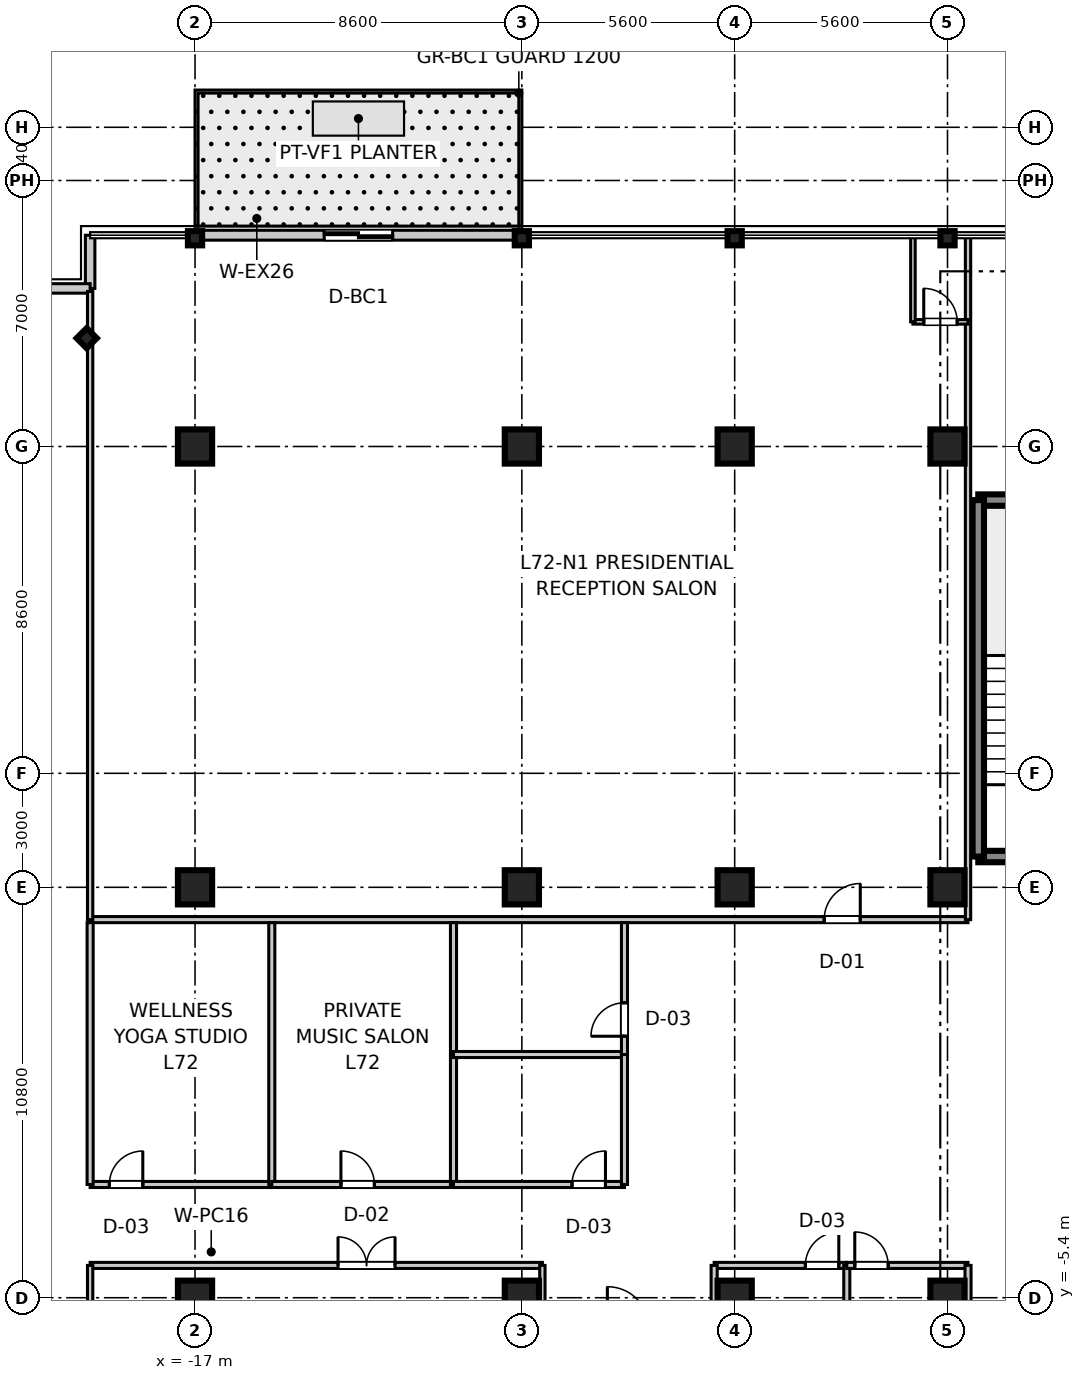
"""IFC4 building model, lengths in metres.
Left out: names, types, materials, properties, quantities, classifications, styles, units other than length and angle.
Written with IfcOpenShell. Run it as: python <this file> out.ifc"""

import sys

from ifc_helpers import new_model, si_unit, direction, frame, frame_2d, origin, origin_2d, place, context, subcontext, project, spatial, rectangle, i_section, extrude, source, transform, mapped, element, fill, save


model = new_model("IFC4")
c1 = context("Model", 3, precision=1e-05, world=origin(), true_north=direction((0.0, 1.0)))
c2 = subcontext(c1, "Body", "Model", "MODEL_VIEW")
j1 = project(units=[si_unit("LENGTHUNIT", "METRE"), si_unit("PLANEANGLEUNIT", "RADIAN")], contexts=[c1])
p1 = place(None, origin())
s1 = spatial("IfcSite", under=j1, at=p1, CompositionType="ELEMENT")
p2 = place(p1, origin())
s2 = spatial("IfcBuilding", under=s1, at=p2, CompositionType="ELEMENT")
p3 = place(p2, frame((0.0, 0.0, 281.3)))
s3 = spatial("IfcBuildingStorey", under=s2, at=p3, CompositionType="ELEMENT", Elevation=281.3)
m1 = source(origin(), c2, "Body", "SweptSolid", [
    extrude(rectangle(XDim=0.9, YDim=0.9, at=origin_2d()), origin(), (0.0, 0.0, 1.0), 3.705),
])
for number, where, z_axis, x_axis in (
    (1, (-17.0, -5.4, 0.0), (0.0, 0.0, 1.0), (1.0, 0.0, 0.0)),
    (2, (-17.0, 5.4, 0.0), (0.0, 0.0, 1.0), (1.0, 0.0, 0.0)),
    (3, (-17.0, 17.0, 0.0), (0.0, 0.0, 1.0), (1.0, 0.0, 0.0)),
    (4, (-8.4, -5.4, 0.0), (0.0, 0.0, 1.0), (1.0, 0.0, 0.0)),
    (5, (-8.4, 5.4, 0.0), (0.0, 0.0, 1.0), (1.0, 0.0, 0.0)),
    (6, (-8.4, 17.0, 0.0), (0.0, 0.0, 1.0), (1.0, 0.0, 0.0)),
    (7, (-2.8, -5.4, 0.0), (0.0, 0.0, 1.0), (1.0, 0.0, 0.0)),
    (8, (-2.8, 5.4, 0.0), (0.0, 0.0, 1.0), (1.0, 0.0, 0.0)),
    (9, (-2.8, 17.0, 0.0), (0.0, 0.0, 1.0), (1.0, 0.0, 0.0)),
    (10, (2.8, -5.4, 0.0), (0.0, 0.0, 1.0), (1.0, 0.0, 0.0)),
    (11, (2.8, 5.4, 0.0), (0.0, 0.0, 1.0), (1.0, 0.0, 0.0)),
    (12, (2.8, 17.0, 0.0), (0.0, 0.0, 1.0), (1.0, 0.0, 0.0)),
):
    element("IfcColumn", number, at=place(p3, frame(where, z_axis=z_axis, x_axis=x_axis)), inside=s3, PredefinedType="COLUMN", context=c2, shape_type="MappedRepresentation", body=[
        mapped(m1, transform((0.0, 0.0, 0.0), scale=1.0)),
    ])
m2 = source(origin(), c2, "Body", "SweptSolid", [
    extrude(i_section(OverallWidth=0.374, OverallDepth=0.374, WebThickness=0.014, FlangeThickness=0.023, at=origin_2d()), origin(), (0.0, 0.0, 1.0), 3.705),
])
for number, where, z_axis, x_axis in (
    (13, (-17.0, 22.48, 0.0), (0.0, 0.0, 1.0), (0.0, 1.0, 0.0)),
    (14, (-8.4, 22.48, 0.0), (0.0, 0.0, 1.0), (0.0, 1.0, 0.0)),
    (15, (-2.8, 22.48, 0.0), (0.0, 0.0, 1.0), (0.0, 1.0, 0.0)),
    (16, (2.8, 22.48, 0.0), (0.0, 0.0, 1.0), (0.0, 1.0, 0.0)),
    (17, (-19.85, 19.85, 0.0), (0.0, 0.0, 1.0), (0.707, 0.707, 0.0)),
):
    element("IfcColumn", number, at=place(p3, frame(where, z_axis=z_axis, x_axis=x_axis)), inside=s3, PredefinedType="COLUMN", context=c2, shape_type="MappedRepresentation", body=[
        mapped(m2, transform((0.0, 0.0, 0.0), scale=1.0)),
    ])
m3 = source(origin(), c2, "Body", "SweptSolid", [
    extrude(rectangle(XDim=3.98, YDim=0.3, at=frame_2d((1.99, 0.0))), origin(), (0.0, 0.0, 1.0), 3.45),
])
for number, where, z_axis, x_axis in (
    (18, (3.61, 6.21, 0.0), (0.0, 0.0, 1.0), (1.0, 0.0, 0.0)),
    (19, (3.61, 15.59, 0.0), (0.0, 0.0, 1.0), (1.0, 0.0, 0.0)),
):
    element("IfcWall", number, at=place(p3, frame(where, z_axis=z_axis, x_axis=x_axis)), inside=s3, PredefinedType="SHEAR", context=c2, shape_type="MappedRepresentation", body=[
        mapped(m3, transform((0.0, 0.0, 0.0), scale=1.0)),
    ])
m4 = source(origin(), c2, "Body", "SweptSolid", [
    extrude(rectangle(XDim=9.38, YDim=0.3, at=frame_2d((4.69, 0.0))), origin(), (0.0, 0.0, 1.0), 3.45),
])
p4 = place(p3, frame((3.61, 6.21, 0.0), z_axis=(0.0, 0.0, 1.0), x_axis=(0.0, 1.0, 0.0)))
e20 = element("IfcWall", 20, at=p4, inside=s3, PredefinedType="SHEAR", context=c2, shape_type="MappedRepresentation", body=[
    mapped(m4, transform((0.0, 0.0, 0.0), scale=1.0)),
])
m5 = source(origin(), c2, "Body", "SweptSolid", [
    extrude(rectangle(XDim=1.4, YDim=0.25, at=frame_2d((0.7, 0.0))), origin(), (0.0, 0.0, 1.0), 3.45),
])
p5 = place(p3, frame((-19.76, 21.16, 0.0), z_axis=(0.0, 0.0, 1.0), x_axis=(0.0, 1.0, 0.0)))
e21 = element("IfcWall", 21, at=p5, inside=s3, PredefinedType="STANDARD", context=c2, shape_type="MappedRepresentation", body=[
    mapped(m5, transform((0.0, 0.0, 0.0), scale=1.0)),
])
m6 = source(origin(), c2, "Body", "SweptSolid", [
    extrude(rectangle(XDim=1.4, YDim=0.25, at=frame_2d((0.7, 0.0))), origin(), (0.0, 0.0, 1.0), 3.45),
])
p6 = place(p3, frame((-21.16, 21.16, 0.0), z_axis=(0.0, 0.0, 1.0), x_axis=(1.0, 0.0, 0.0)))
e22 = element("IfcWall", 22, at=p6, inside=s3, PredefinedType="STANDARD", context=c2, shape_type="MappedRepresentation", body=[
    mapped(m6, transform((0.0, 0.0, 0.0), scale=1.0)),
])
m7 = source(origin(), c2, "Body", "SweptSolid", [
    extrude(rectangle(XDim=8.6, YDim=0.26, at=frame_2d((4.3, 0.0))), origin(), (0.0, 0.0, 1.0), 2.93),
])
p7 = place(p3, frame((-17.0, 22.56, 0.0), z_axis=(0.0, 0.0, 1.0), x_axis=(1.0, 0.0, 0.0)))
e23 = element("IfcWall", 23, at=p7, inside=s3, PredefinedType="STANDARD", context=c2, shape_type="MappedRepresentation", body=[
    mapped(m7, transform((0.0, 0.0, 0.0), scale=1.0)),
])
p8 = place(p7, frame((3.4, 0.0, 0.0)))
e24 = element("IfcOpeningElement", 24, at=p8, cuts=e23, PredefinedType="OPENING", context=c2, shape_type="SweptSolid", body=[
    extrude(rectangle(XDim=1.8, YDim=2.25, at=frame_2d((0.9, 1.125))), frame((0.0, 0.14, 0.0), z_axis=(0.0, -1.0, 0.0), x_axis=(1.0, 0.0, 0.0)), (0.0, 0.0, 1.0), 0.28),
])
m8 = source(origin(), c2, "Body", "SweptSolid", [
    extrude(rectangle(XDim=23.1, YDim=0.16, at=frame_2d((11.55, 0.0))), origin(), (0.0, 0.0, 1.0), 2.79),
])
p9 = place(p3, frame((-19.76, 4.55, 0.0), z_axis=(0.0, 0.0, 1.0), x_axis=(1.0, 0.0, 0.0)))
e25 = element("IfcWall", 25, at=p9, inside=s3, PredefinedType="PARTITIONING", context=c2, shape_type="MappedRepresentation", body=[
    mapped(m8, transform((0.0, 0.0, 0.0), scale=1.0)),
])
p10 = place(p9, frame((19.315, 0.0, 0.0)))
e26 = element("IfcOpeningElement", 26, at=p10, cuts=e25, PredefinedType="OPENING", context=c2, shape_type="SweptSolid", body=[
    extrude(rectangle(XDim=0.95, YDim=2.1, at=frame_2d((0.475, 1.05))), frame((0.0, 0.09, 0.0), z_axis=(0.0, -1.0, 0.0), x_axis=(1.0, 0.0, 0.0)), (0.0, 0.0, 1.0), 0.18),
])
m9 = source(origin(), c2, "Body", "SweptSolid", [
    extrude(rectangle(XDim=16.53, YDim=0.14, at=frame_2d((8.265, 0.0))), origin(), (0.0, 0.0, 1.0), 2.79),
])
p11 = place(p3, frame((-19.76, 4.55, 0.0), z_axis=(0.0, 0.0, 1.0), x_axis=(0.0, 1.0, 0.0)))
e27 = element("IfcWall", 27, at=p11, inside=s3, PredefinedType="PARTITIONING", context=c2, shape_type="MappedRepresentation", body=[
    mapped(m9, transform((0.0, 0.0, 0.0), scale=1.0)),
])
m10 = source(origin(), c2, "Body", "SweptSolid", [
    extrude(rectangle(XDim=17.95, YDim=0.14, at=frame_2d((8.975, 0.0))), origin(), (0.0, 0.0, 1.0), 2.79),
])
p12 = place(p3, frame((3.34, 4.55, 0.0), z_axis=(0.0, 0.0, 1.0), x_axis=(0.0, 1.0, 0.0)))
e28 = element("IfcWall", 28, at=p12, inside=s3, PredefinedType="PARTITIONING", context=c2, shape_type="MappedRepresentation", body=[
    mapped(m10, transform((0.0, 0.0, 0.0), scale=1.0)),
])
m11 = source(origin(), c2, "Body", "SweptSolid", [
    extrude(rectangle(XDim=1.45, YDim=0.12, at=frame_2d((0.725, 0.0))), origin(), (0.0, 0.0, 1.0), 2.79),
])
p13 = place(p3, frame((1.89, 20.28, 0.0), z_axis=(0.0, 0.0, 1.0), x_axis=(1.0, 0.0, 0.0)))
e29 = element("IfcWall", 29, at=p13, inside=s3, PredefinedType="PARTITIONING", context=c2, shape_type="MappedRepresentation", body=[
    mapped(m11, transform((0.0, 0.0, 0.0), scale=1.0)),
])
p14 = place(p13, frame((0.285, 0.0, 0.0)))
e30 = element("IfcOpeningElement", 30, at=p14, cuts=e29, PredefinedType="OPENING", context=c2, shape_type="SweptSolid", body=[
    extrude(rectangle(XDim=0.88, YDim=2.1, at=frame_2d((0.44, 1.05))), frame((0.0, 0.07, 0.0), z_axis=(0.0, -1.0, 0.0), x_axis=(1.0, 0.0, 0.0)), (0.0, 0.0, 1.0), 0.14),
])
m12 = source(origin(), c2, "Body", "SweptSolid", [
    extrude(rectangle(XDim=2.22, YDim=0.12, at=frame_2d((1.11, 0.0))), origin(), (0.0, 0.0, 1.0), 2.79),
])
p15 = place(p3, frame((1.89, 20.28, 0.0), z_axis=(0.0, 0.0, 1.0), x_axis=(0.0, 1.0, 0.0)))
e31 = element("IfcWall", 31, at=p15, inside=s3, PredefinedType="PARTITIONING", context=c2, shape_type="MappedRepresentation", body=[
    mapped(m12, transform((0.0, 0.0, 0.0), scale=1.0)),
])
m13 = source(origin(), c2, "Body", "SweptSolid", [
    extrude(rectangle(XDim=11.9, YDim=0.16, at=frame_2d((5.95, 0.0))), origin(), (0.0, 0.0, 1.0), 2.79),
])
p16 = place(p3, frame((-19.76, -4.55, 0.0), z_axis=(0.0, 0.0, 1.0), x_axis=(1.0, 0.0, 0.0)))
e32 = element("IfcWall", 32, at=p16, inside=s3, PredefinedType="PARTITIONING", context=c2, shape_type="MappedRepresentation", body=[
    mapped(m13, transform((0.0, 0.0, 0.0), scale=1.0)),
])
p17 = place(p16, frame((6.523, 0.0, 0.0)))
e33 = element("IfcOpeningElement", 33, at=p17, cuts=e32, PredefinedType="OPENING", context=c2, shape_type="SweptSolid", body=[
    extrude(rectangle(XDim=1.5, YDim=2.15, at=frame_2d((0.75, 1.075))), frame((0.0, 0.09, 0.0), z_axis=(0.0, -1.0, 0.0), x_axis=(1.0, 0.0, 0.0)), (0.0, 0.0, 1.0), 0.18),
])
p18 = place(p3, frame((-19.76, -21.08, 0.0), z_axis=(0.0, 0.0, 1.0), x_axis=(0.0, 1.0, 0.0)))
e34 = element("IfcWall", 34, at=p18, inside=s3, PredefinedType="PARTITIONING", context=c2, shape_type="MappedRepresentation", body=[
    mapped(m9, transform((0.0, 0.0, 0.0), scale=1.0)),
])
p19 = place(p3, frame((-7.86, -22.5, 0.0), z_axis=(0.0, 0.0, 1.0), x_axis=(0.0, 1.0, 0.0)))
e35 = element("IfcWall", 35, at=p19, inside=s3, PredefinedType="PARTITIONING", context=c2, shape_type="MappedRepresentation", body=[
    mapped(m10, transform((0.0, 0.0, 0.0), scale=1.0)),
])
m14 = source(origin(), c2, "Body", "SweptSolid", [
    extrude(rectangle(XDim=3.49, YDim=0.16, at=frame_2d((1.745, 0.0))), origin(), (0.0, 0.0, 1.0), 2.79),
])
p20 = place(p3, frame((-3.34, -4.55, 0.0), z_axis=(0.0, 0.0, 1.0), x_axis=(1.0, 0.0, 0.0)))
e36 = element("IfcWall", 36, at=p20, inside=s3, PredefinedType="PARTITIONING", context=c2, shape_type="MappedRepresentation", body=[
    mapped(m14, transform((0.0, 0.0, 0.0), scale=1.0)),
])
p21 = place(p20, frame((2.4, 0.0, 0.0)))
e37 = element("IfcOpeningElement", 37, at=p21, cuts=e36, PredefinedType="OPENING", context=c2, shape_type="SweptSolid", body=[
    extrude(rectangle(XDim=0.88, YDim=2.1, at=frame_2d((0.44, 1.05))), frame((0.0, 0.09, 0.0), z_axis=(0.0, -1.0, 0.0), x_axis=(1.0, 0.0, 0.0)), (0.0, 0.0, 1.0), 0.18),
])
m15 = source(origin(), c2, "Body", "SweptSolid", [
    extrude(rectangle(XDim=17.95, YDim=0.16, at=frame_2d((8.975, 0.0))), origin(), (0.0, 0.0, 1.0), 2.79),
])
for number, where, z_axis, x_axis in (
    (38, (-3.34, -22.5, 0.0), (0.0, 0.0, 1.0), (0.0, 1.0, 0.0)),
    (39, (0.15, -22.5, 0.0), (0.0, 0.0, 1.0), (0.0, 1.0, 0.0)),
):
    element("IfcWall", number, at=place(p3, frame(where, z_axis=z_axis, x_axis=x_axis)), inside=s3, PredefinedType="PARTITIONING", context=c2, shape_type="MappedRepresentation", body=[
        mapped(m15, transform((0.0, 0.0, 0.0), scale=1.0)),
    ])
m16 = source(origin(), c2, "Body", "SweptSolid", [
    extrude(rectangle(XDim=3.19, YDim=0.16, at=frame_2d((1.595, 0.0))), origin(), (0.0, 0.0, 1.0), 2.79),
])
p22 = place(p3, frame((0.15, -4.55, 0.0), z_axis=(0.0, 0.0, 1.0), x_axis=(1.0, 0.0, 0.0)))
e40 = element("IfcWall", 40, at=p22, inside=s3, PredefinedType="PARTITIONING", context=c2, shape_type="MappedRepresentation", body=[
    mapped(m16, transform((0.0, 0.0, 0.0), scale=1.0)),
])
p23 = place(p22, frame((0.21, 0.0, 0.0)))
e41 = element("IfcOpeningElement", 41, at=p23, cuts=e40, PredefinedType="OPENING", context=c2, shape_type="SweptSolid", body=[
    extrude(rectangle(XDim=0.88, YDim=2.1, at=frame_2d((0.44, 1.05))), frame((0.0, 0.09, 0.0), z_axis=(0.0, -1.0, 0.0), x_axis=(1.0, 0.0, 0.0)), (0.0, 0.0, 1.0), 0.18),
])
p24 = place(p3, frame((3.34, -22.5, 0.0), z_axis=(0.0, 0.0, 1.0), x_axis=(0.0, 1.0, 0.0)))
e42 = element("IfcWall", 42, at=p24, inside=s3, PredefinedType="PARTITIONING", context=c2, shape_type="MappedRepresentation", body=[
    mapped(m15, transform((0.0, 0.0, 0.0), scale=1.0)),
])
m17 = source(origin(), c2, "Body", "SweptSolid", [
    extrude(rectangle(XDim=4.78, YDim=0.16, at=frame_2d((2.39, 0.0))), origin(), (0.0, 0.0, 1.0), 2.79),
])
p25 = place(p3, frame((-19.76, -2.42, 0.0), z_axis=(0.0, 0.0, 1.0), x_axis=(1.0, 0.0, 0.0)))
e43 = element("IfcWall", 43, at=p25, inside=s3, PredefinedType="PARTITIONING", context=c2, shape_type="MappedRepresentation", body=[
    mapped(m17, transform((0.0, 0.0, 0.0), scale=1.0)),
])
p26 = place(p25, frame((0.506, 0.0, 0.0)))
e44 = element("IfcOpeningElement", 44, at=p26, cuts=e43, PredefinedType="OPENING", context=c2, shape_type="SweptSolid", body=[
    extrude(rectangle(XDim=0.88, YDim=2.1, at=frame_2d((0.44, 1.05))), frame((0.0, 0.09, 0.0), z_axis=(0.0, -1.0, 0.0), x_axis=(1.0, 0.0, 0.0)), (0.0, 0.0, 1.0), 0.18),
])
m18 = source(origin(), c2, "Body", "SweptSolid", [
    extrude(rectangle(XDim=6.89, YDim=0.16, at=frame_2d((3.445, 0.0))), origin(), (0.0, 0.0, 1.0), 2.79),
])
for number, where, z_axis, x_axis in (
    (45, (-19.76, -2.42, 0.0), (0.0, 0.0, 1.0), (0.0, 1.0, 0.0)),
    (46, (-14.98, -2.42, 0.0), (0.0, 0.0, 1.0), (0.0, 1.0, 0.0)),
):
    element("IfcWall", number, at=place(p3, frame(where, z_axis=z_axis, x_axis=x_axis)), inside=s3, PredefinedType="PARTITIONING", context=c2, shape_type="MappedRepresentation", body=[
        mapped(m18, transform((0.0, 0.0, 0.0), scale=1.0)),
    ])
m19 = source(origin(), c2, "Body", "SweptSolid", [
    extrude(rectangle(XDim=4.781, YDim=0.16, at=frame_2d((2.391, 0.0))), origin(), (0.0, 0.0, 1.0), 2.79),
])
p27 = place(p3, frame((-14.98, -2.42, 0.0), z_axis=(0.0, 0.0, 1.0), x_axis=(1.0, 0.0, 0.0)))
e47 = element("IfcWall", 47, at=p27, inside=s3, PredefinedType="PARTITIONING", context=c2, shape_type="MappedRepresentation", body=[
    mapped(m19, transform((0.0, 0.0, 0.0), scale=1.0)),
])
p28 = place(p27, frame((1.819, 0.0, 0.0)))
e48 = element("IfcOpeningElement", 48, at=p28, cuts=e47, PredefinedType="OPENING", context=c2, shape_type="SweptSolid", body=[
    extrude(rectangle(XDim=0.88, YDim=2.1, at=frame_2d((0.44, 1.05))), frame((0.0, 0.09, 0.0), z_axis=(0.0, -1.0, 0.0), x_axis=(1.0, 0.0, 0.0)), (0.0, 0.0, 1.0), 0.18),
])
p29 = place(p3, frame((-10.199, -2.42, 0.0), z_axis=(0.0, 0.0, 1.0), x_axis=(0.0, 1.0, 0.0)))
e49 = element("IfcWall", 49, at=p29, inside=s3, PredefinedType="PARTITIONING", context=c2, shape_type="MappedRepresentation", body=[
    mapped(m18, transform((0.0, 0.0, 0.0), scale=1.0)),
])
m20 = source(origin(), c2, "Body", "SweptSolid", [
    extrude(rectangle(XDim=4.499, YDim=0.16, at=frame_2d((2.25, 0.0))), origin(), (0.0, 0.0, 1.0), 2.79),
])
p30 = place(p3, frame((-10.199, -2.42, 0.0), z_axis=(0.0, 0.0, 1.0), x_axis=(1.0, 0.0, 0.0)))
e50 = element("IfcWall", 50, at=p30, inside=s3, PredefinedType="PARTITIONING", context=c2, shape_type="MappedRepresentation", body=[
    mapped(m20, transform((0.0, 0.0, 0.0), scale=1.0)),
])
p31 = place(p30, frame((3.119, 0.0, 0.0)))
e51 = element("IfcOpeningElement", 51, at=p31, cuts=e50, PredefinedType="OPENING", context=c2, shape_type="SweptSolid", body=[
    extrude(rectangle(XDim=0.88, YDim=2.1, at=frame_2d((0.44, 1.05))), frame((0.0, 0.09, 0.0), z_axis=(0.0, -1.0, 0.0), x_axis=(1.0, 0.0, 0.0)), (0.0, 0.0, 1.0), 0.18),
])
p32 = place(p3, frame((-10.199, 1.0, 0.0), z_axis=(0.0, 0.0, 1.0), x_axis=(1.0, 0.0, 0.0)))
e52 = element("IfcWall", 52, at=p32, inside=s3, PredefinedType="PARTITIONING", context=c2, shape_type="MappedRepresentation", body=[
    mapped(m20, transform((0.0, 0.0, 0.0), scale=1.0)),
])
m21 = source(origin(), c2, "Body", "SweptSolid", [
    extrude(rectangle(XDim=3.42, YDim=0.16, at=frame_2d((1.71, 0.0))), origin(), (0.0, 0.0, 1.0), 2.79),
])
p33 = place(p3, frame((-5.7, -2.42, 0.0), z_axis=(0.0, 0.0, 1.0), x_axis=(0.0, 1.0, 0.0)))
e53 = element("IfcWall", 53, at=p33, inside=s3, PredefinedType="PARTITIONING", context=c2, shape_type="MappedRepresentation", body=[
    mapped(m21, transform((0.0, 0.0, 0.0), scale=1.0)),
])
m22 = source(origin(), c2, "Body", "SweptSolid", [
    extrude(rectangle(XDim=3.47, YDim=0.16, at=frame_2d((1.735, 0.0))), origin(), (0.0, 0.0, 1.0), 2.79),
])
p34 = place(p3, frame((-5.7, 1.0, 0.0), z_axis=(0.0, 0.0, 1.0), x_axis=(0.0, 1.0, 0.0)))
e54 = element("IfcWall", 54, at=p34, inside=s3, PredefinedType="PARTITIONING", context=c2, shape_type="MappedRepresentation", body=[
    mapped(m22, transform((0.0, 0.0, 0.0), scale=1.0)),
])
p35 = place(p34, frame((0.481, 0.0, 0.0)))
e55 = element("IfcOpeningElement", 55, at=p35, cuts=e54, PredefinedType="OPENING", context=c2, shape_type="SweptSolid", body=[
    extrude(rectangle(XDim=0.88, YDim=2.1, at=frame_2d((0.44, 1.05))), frame((0.0, 0.09, 0.0), z_axis=(0.0, -1.0, 0.0), x_axis=(1.0, 0.0, 0.0)), (0.0, 0.0, 1.0), 0.18),
])
m23 = source(origin(), c2, "Body", "SweptSolid", [
    extrude(rectangle(XDim=0.88, YDim=2.1, at=frame_2d((0.44, 1.05))), frame((0.0, 0.025, 0.0), z_axis=(0.0, -1.0, 0.0), x_axis=(1.0, 0.0, 0.0)), (0.0, 0.0, 1.0), 0.05),
])
p36 = place(p14, origin())
e56 = element("IfcDoor", 56, at=p36, inside=s3, OperationType="SINGLE_SWING_LEFT", PredefinedType="DOOR", context=c2, shape_type="MappedRepresentation", body=[
    mapped(m23, transform((0.0, 0.0, 0.0), scale=1.0)),
])
fill(e30, e56)
m24 = source(origin(), c2, "Body", "SweptSolid", [
    extrude(rectangle(XDim=0.95, YDim=2.1, at=frame_2d((0.475, 1.05))), frame((0.0, 0.025, 0.0), z_axis=(0.0, -1.0, 0.0), x_axis=(1.0, 0.0, 0.0)), (0.0, 0.0, 1.0), 0.05),
])
p37 = place(p10, origin())
e57 = element("IfcDoor", 57, at=p37, inside=s3, OperationType="SINGLE_SWING_RIGHT", PredefinedType="DOOR", context=c2, shape_type="MappedRepresentation", body=[
    mapped(m24, transform((0.0, 0.0, 0.0), scale=1.0)),
])
fill(e26, e57)
m25 = source(origin(), c2, "Body", "SweptSolid", [
    extrude(rectangle(XDim=1.5, YDim=2.15, at=frame_2d((0.75, 1.075))), frame((0.0, 0.025, 0.0), z_axis=(0.0, -1.0, 0.0), x_axis=(1.0, 0.0, 0.0)), (0.0, 0.0, 1.0), 0.05),
])
p38 = place(p17, frame((1.5, 0.0, 0.0), z_axis=(0.0, 0.0, 1.0), x_axis=(-1.0, 0.0, 0.0)))
e58 = element("IfcDoor", 58, at=p38, inside=s3, OperationType="DOUBLE_DOOR_SINGLE_SWING", PredefinedType="DOOR", context=c2, shape_type="MappedRepresentation", body=[
    mapped(m25, transform((0.0, 0.0, 0.0), scale=1.0)),
])
fill(e33, e58)
p39 = place(p21, frame((0.88, 0.0, 0.0), z_axis=(0.0, 0.0, 1.0), x_axis=(-1.0, 0.0, 0.0)))
e59 = element("IfcDoor", 59, at=p39, inside=s3, OperationType="SINGLE_SWING_RIGHT", PredefinedType="DOOR", context=c2, shape_type="MappedRepresentation", body=[
    mapped(m23, transform((0.0, 0.0, 0.0), scale=1.0)),
])
fill(e37, e59)
p40 = place(p23, frame((0.88, 0.0, 0.0), z_axis=(0.0, 0.0, 1.0), x_axis=(-1.0, 0.0, 0.0)))
e60 = element("IfcDoor", 60, at=p40, inside=s3, OperationType="SINGLE_SWING_LEFT", PredefinedType="DOOR", context=c2, shape_type="MappedRepresentation", body=[
    mapped(m23, transform((0.0, 0.0, 0.0), scale=1.0)),
])
fill(e41, e60)
p41 = place(p26, origin())
e61 = element("IfcDoor", 61, at=p41, inside=s3, OperationType="SINGLE_SWING_RIGHT", PredefinedType="DOOR", context=c2, shape_type="MappedRepresentation", body=[
    mapped(m23, transform((0.0, 0.0, 0.0), scale=1.0)),
])
fill(e44, e61)
p42 = place(p28, origin())
e62 = element("IfcDoor", 62, at=p42, inside=s3, OperationType="SINGLE_SWING_LEFT", PredefinedType="DOOR", context=c2, shape_type="MappedRepresentation", body=[
    mapped(m23, transform((0.0, 0.0, 0.0), scale=1.0)),
])
fill(e48, e62)
p43 = place(p31, origin())
e63 = element("IfcDoor", 63, at=p43, inside=s3, OperationType="SINGLE_SWING_RIGHT", PredefinedType="DOOR", context=c2, shape_type="MappedRepresentation", body=[
    mapped(m23, transform((0.0, 0.0, 0.0), scale=1.0)),
])
fill(e51, e63)
p44 = place(p35, origin())
e64 = element("IfcDoor", 64, at=p44, inside=s3, OperationType="SINGLE_SWING_LEFT", PredefinedType="DOOR", context=c2, shape_type="MappedRepresentation", body=[
    mapped(m23, transform((0.0, 0.0, 0.0), scale=1.0)),
])
fill(e55, e64)
m26 = source(origin(), c2, "Body", "SweptSolid", [
    extrude(rectangle(XDim=1.8, YDim=2.25, at=frame_2d((0.9, 1.125))), frame((0.0, 0.025, 0.0), z_axis=(0.0, -1.0, 0.0), x_axis=(1.0, 0.0, 0.0)), (0.0, 0.0, 1.0), 0.05),
])
p45 = place(p8, origin())
e65 = element("IfcDoor", 65, at=p45, inside=s3, OperationType="DOUBLE_DOOR_SLIDING", PredefinedType="DOOR", context=c2, shape_type="MappedRepresentation", body=[
    mapped(m26, transform((0.0, 0.0, 0.0), scale=1.0)),
])
fill(e24, e65)
save(model, sys.argv[1])
